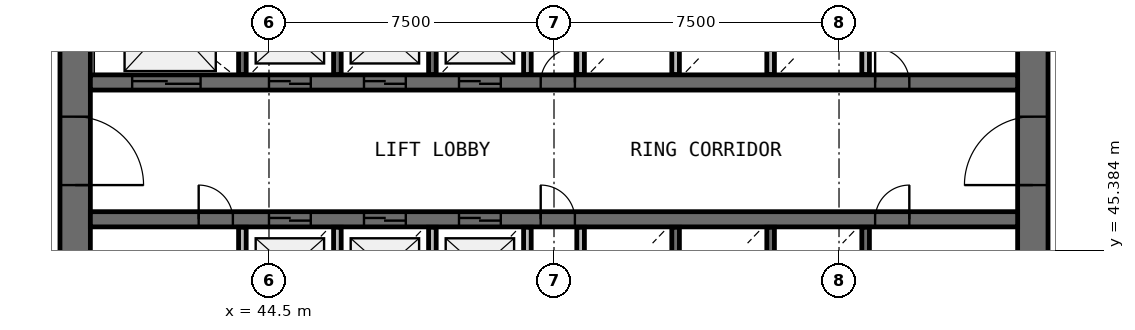
"""IFC4 building model, lengths in metres.
Left out: names, types, materials, properties, quantities, classifications, styles, units other than length and angle.
Written with IfcOpenShell. Run it as: python <this file> out.ifc"""

import sys

from ifc_helpers import new_model, si_unit, direction, frame, frame_2d, origin, place, context, subcontext, project, spatial, rectangle, extrude, source, transform, mapped, element, fill, save


model = new_model("IFC4")
c1 = context("Model", 3, precision=1e-05, world=origin(), true_north=direction((0.0, 1.0)))
c2 = subcontext(c1, "Body", "Model", "MODEL_VIEW")
j1 = project(units=[si_unit("LENGTHUNIT", "METRE"), si_unit("PLANEANGLEUNIT", "RADIAN")], contexts=[c1])
p1 = place(None, origin())
s1 = spatial("IfcSite", under=j1, at=p1, CompositionType="ELEMENT")
p2 = place(p1, origin())
s2 = spatial("IfcBuilding", under=s1, at=p2, CompositionType="ELEMENT")
p3 = place(p2, frame((0.0, 0.0, 124.9)))
s3 = spatial("IfcBuildingStorey", under=s2, at=p3, CompositionType="ELEMENT", Elevation=124.9)
p4 = place(p3, frame((64.6, 38.0, 0.0), z_axis=(0.0, 0.0, 1.0), x_axis=(0.0, 1.0, 0.0)))
e1 = element("IfcWall", 1, at=p4, inside=s3, PredefinedType="SHEAR", context=c2, shape_type="SweptSolid", body=[
    extrude(rectangle(XDim=20.0, YDim=0.8, at=frame_2d((10.0, 0.0))), origin(), (0.0, 0.0, 1.0), 4.1),
])
p5 = place(p4, frame((9.1, 0.0, 0.0)))
e2 = element("IfcOpeningElement", 2, at=p5, cuts=e1, PredefinedType="OPENING", context=c2, shape_type="SweptSolid", body=[
    extrude(rectangle(XDim=1.8, YDim=2.1, at=frame_2d((0.9, 1.05))), frame((0.0, 0.41, 0.0), z_axis=(0.0, -1.0, 0.0), x_axis=(1.0, 0.0, 0.0)), (0.0, 0.0, 1.0), 0.82),
])
p6 = place(p3, frame((39.4, 58.0, 0.0), z_axis=(0.0, 0.0, 1.0), x_axis=(0.0, -1.0, 0.0)))
e3 = element("IfcWall", 3, at=p6, inside=s3, PredefinedType="SHEAR", context=c2, shape_type="SweptSolid", body=[
    extrude(rectangle(XDim=20.0, YDim=0.8, at=frame_2d((10.0, 0.0))), origin(), (0.0, 0.0, 1.0), 4.1),
])
p7 = place(p6, frame((9.1, 0.0, 0.0)))
e4 = element("IfcOpeningElement", 4, at=p7, cuts=e3, PredefinedType="OPENING", context=c2, shape_type="SweptSolid", body=[
    extrude(rectangle(XDim=1.8, YDim=2.1, at=frame_2d((0.9, 1.05))), frame((0.0, 0.41, 0.0), z_axis=(0.0, -1.0, 0.0), x_axis=(1.0, 0.0, 0.0)), (0.0, 0.0, 1.0), 0.82),
])
p8 = place(p3, frame((39.8, 49.8, 0.0), z_axis=(0.0, 0.0, 1.0), x_axis=(1.0, 0.0, 0.0)))
e5 = element("IfcWall", 5, at=p8, inside=s3, PredefinedType="SHEAR", context=c2, shape_type="SweptSolid", body=[
    extrude(rectangle(XDim=24.4, YDim=0.4, at=frame_2d((12.2, 0.0))), origin(), (0.0, 0.0, 1.0), 4.1),
])
p9 = place(p8, frame((4.7, 0.0, 0.0)))
e6 = element("IfcOpeningElement", 6, at=p9, cuts=e5, PredefinedType="OPENING", context=c2, shape_type="SweptSolid", body=[
    extrude(rectangle(XDim=1.1, YDim=2.1, at=frame_2d((0.55, 1.05))), frame((0.0, 0.21, 0.0), z_axis=(0.0, -1.0, 0.0), x_axis=(1.0, 0.0, 0.0)), (0.0, 0.0, 1.0), 0.42),
])
p10 = place(p8, frame((7.2, 0.0, 0.0)))
e7 = element("IfcOpeningElement", 7, at=p10, cuts=e5, PredefinedType="OPENING", context=c2, shape_type="SweptSolid", body=[
    extrude(rectangle(XDim=1.1, YDim=2.1, at=frame_2d((0.55, 1.05))), frame((0.0, 0.21, 0.0), z_axis=(0.0, -1.0, 0.0), x_axis=(1.0, 0.0, 0.0)), (0.0, 0.0, 1.0), 0.42),
])
p11 = place(p8, frame((9.7, 0.0, 0.0)))
e8 = element("IfcOpeningElement", 8, at=p11, cuts=e5, PredefinedType="OPENING", context=c2, shape_type="SweptSolid", body=[
    extrude(rectangle(XDim=1.1, YDim=2.1, at=frame_2d((0.55, 1.05))), frame((0.0, 0.21, 0.0), z_axis=(0.0, -1.0, 0.0), x_axis=(1.0, 0.0, 0.0)), (0.0, 0.0, 1.0), 0.42),
])
p12 = place(p8, frame((1.1, 0.0, 0.0)))
e9 = element("IfcOpeningElement", 9, at=p12, cuts=e5, PredefinedType="OPENING", context=c2, shape_type="SweptSolid", body=[
    extrude(rectangle(XDim=1.8, YDim=2.4, at=frame_2d((0.9, 1.2))), frame((0.0, 0.21, 0.0), z_axis=(0.0, -1.0, 0.0), x_axis=(1.0, 0.0, 0.0)), (0.0, 0.0, 1.0), 0.42),
])
p13 = place(p8, frame((20.65, 0.0, 0.0)))
e10 = element("IfcOpeningElement", 10, at=p13, cuts=e5, PredefinedType="OPENING", context=c2, shape_type="SweptSolid", body=[
    extrude(rectangle(XDim=0.9, YDim=2.1, at=frame_2d((0.45, 1.05))), frame((0.0, 0.21, 0.0), z_axis=(0.0, -1.0, 0.0), x_axis=(1.0, 0.0, 0.0)), (0.0, 0.0, 1.0), 0.42),
])
p14 = place(p8, frame((11.85, 0.0, 0.0)))
e11 = element("IfcOpeningElement", 11, at=p14, cuts=e5, PredefinedType="OPENING", context=c2, shape_type="SweptSolid", body=[
    extrude(rectangle(XDim=0.9, YDim=2.1, at=frame_2d((0.45, 1.05))), frame((0.0, 0.21, 0.0), z_axis=(0.0, -1.0, 0.0), x_axis=(1.0, 0.0, 0.0)), (0.0, 0.0, 1.0), 0.42),
])
p15 = place(p3, frame((39.8, 46.2, 0.0), z_axis=(0.0, 0.0, 1.0), x_axis=(1.0, 0.0, 0.0)))
e12 = element("IfcWall", 12, at=p15, inside=s3, PredefinedType="SHEAR", context=c2, shape_type="SweptSolid", body=[
    extrude(rectangle(XDim=24.4, YDim=0.4, at=frame_2d((12.2, 0.0))), origin(), (0.0, 0.0, 1.0), 4.1),
])
p16 = place(p15, frame((4.7, 0.0, 0.0)))
e13 = element("IfcOpeningElement", 13, at=p16, cuts=e12, PredefinedType="OPENING", context=c2, shape_type="SweptSolid", body=[
    extrude(rectangle(XDim=1.1, YDim=2.1, at=frame_2d((0.55, 1.05))), frame((0.0, 0.21, 0.0), z_axis=(0.0, -1.0, 0.0), x_axis=(1.0, 0.0, 0.0)), (0.0, 0.0, 1.0), 0.42),
])
p17 = place(p15, frame((7.2, 0.0, 0.0)))
e14 = element("IfcOpeningElement", 14, at=p17, cuts=e12, PredefinedType="OPENING", context=c2, shape_type="SweptSolid", body=[
    extrude(rectangle(XDim=1.1, YDim=2.1, at=frame_2d((0.55, 1.05))), frame((0.0, 0.21, 0.0), z_axis=(0.0, -1.0, 0.0), x_axis=(1.0, 0.0, 0.0)), (0.0, 0.0, 1.0), 0.42),
])
p18 = place(p15, frame((9.7, 0.0, 0.0)))
e15 = element("IfcOpeningElement", 15, at=p18, cuts=e12, PredefinedType="OPENING", context=c2, shape_type="SweptSolid", body=[
    extrude(rectangle(XDim=1.1, YDim=2.1, at=frame_2d((0.55, 1.05))), frame((0.0, 0.21, 0.0), z_axis=(0.0, -1.0, 0.0), x_axis=(1.0, 0.0, 0.0)), (0.0, 0.0, 1.0), 0.42),
])
p19 = place(p15, frame((20.65, 0.0, 0.0)))
e16 = element("IfcOpeningElement", 16, at=p19, cuts=e12, PredefinedType="OPENING", context=c2, shape_type="SweptSolid", body=[
    extrude(rectangle(XDim=0.9, YDim=2.1, at=frame_2d((0.45, 1.05))), frame((0.0, 0.21, 0.0), z_axis=(0.0, -1.0, 0.0), x_axis=(1.0, 0.0, 0.0)), (0.0, 0.0, 1.0), 0.42),
])
p20 = place(p15, frame((2.85, 0.0, 0.0)))
e17 = element("IfcOpeningElement", 17, at=p20, cuts=e12, PredefinedType="OPENING", context=c2, shape_type="SweptSolid", body=[
    extrude(rectangle(XDim=0.9, YDim=2.1, at=frame_2d((0.45, 1.05))), frame((0.0, 0.21, 0.0), z_axis=(0.0, -1.0, 0.0), x_axis=(1.0, 0.0, 0.0)), (0.0, 0.0, 1.0), 0.42),
])
p21 = place(p15, frame((11.85, 0.0, 0.0)))
e18 = element("IfcOpeningElement", 18, at=p21, cuts=e12, PredefinedType="OPENING", context=c2, shape_type="SweptSolid", body=[
    extrude(rectangle(XDim=0.9, YDim=2.1, at=frame_2d((0.45, 1.05))), frame((0.0, 0.21, 0.0), z_axis=(0.0, -1.0, 0.0), x_axis=(1.0, 0.0, 0.0)), (0.0, 0.0, 1.0), 0.42),
])
for number, where, z_axis, x_axis in (
    (19, (43.8, 45.99, 0.0), (0.0, 0.0, 1.0), (0.0, -1.0, 0.0)),
    (20, (43.8, 52.37, 0.0), (0.0, 0.0, 1.0), (0.0, -1.0, 0.0)),
):
    element("IfcWall", number, at=place(p3, frame(where, z_axis=z_axis, x_axis=x_axis)), inside=s3, PredefinedType="SOLIDWALL", context=c2, shape_type="SweptSolid", body=[
        extrude(rectangle(XDim=2.36, YDim=0.2, at=frame_2d((1.18, 0.0))), origin(), (0.0, 0.0, 1.0), 3.6),
    ])
p22 = place(p3, frame((46.3, 43.6, 0.0), z_axis=(0.0, 0.0, 1.0), x_axis=(0.0, 1.0, 0.0)))
e21 = element("IfcWall", 21, at=p22, inside=s3, PredefinedType="SOLIDWALL", context=c2, shape_type="SweptSolid", body=[
    extrude(rectangle(XDim=2.39, YDim=0.2, at=frame_2d((1.195, 0.0))), origin(), (0.0, 0.0, 1.0), 3.6),
])
for number, where, z_axis, x_axis in (
    (22, (46.3, 50.01, 0.0), (0.0, 0.0, 1.0), (0.0, 1.0, 0.0)),
    (23, (48.8, 43.63, 0.0), (0.0, 0.0, 1.0), (0.0, 1.0, 0.0)),
    (24, (48.8, 50.01, 0.0), (0.0, 0.0, 1.0), (0.0, 1.0, 0.0)),
    (25, (51.3, 43.63, 0.0), (0.0, 0.0, 1.0), (0.0, 1.0, 0.0)),
):
    element("IfcWall", number, at=place(p3, frame(where, z_axis=z_axis, x_axis=x_axis)), inside=s3, PredefinedType="SOLIDWALL", context=c2, shape_type="SweptSolid", body=[
        extrude(rectangle(XDim=2.36, YDim=0.2, at=frame_2d((1.18, 0.0))), origin(), (0.0, 0.0, 1.0), 3.6),
    ])
for number, where, z_axis, x_axis in (
    (26, (51.3, 50.01, 0.0), (0.0, 0.0, 1.0), (0.0, 1.0, 0.0)),
    (27, (52.7, 45.99, 0.0), (0.0, 0.0, 1.0), (0.0, -1.0, 0.0)),
):
    element("IfcWall", number, at=place(p3, frame(where, z_axis=z_axis, x_axis=x_axis)), inside=s3, PredefinedType="SOLIDWALL", context=c2, shape_type="SweptSolid", body=[
        extrude(rectangle(XDim=2.39, YDim=0.2, at=frame_2d((1.195, 0.0))), origin(), (0.0, 0.0, 1.0), 3.6),
    ])
for number, where, z_axis, x_axis in (
    (28, (52.7, 52.37, 0.0), (0.0, 0.0, 1.0), (0.0, -1.0, 0.0)),
    (29, (55.2, 43.63, 0.0), (0.0, 0.0, 1.0), (0.0, 1.0, 0.0)),
    (30, (55.2, 50.01, 0.0), (0.0, 0.0, 1.0), (0.0, 1.0, 0.0)),
    (31, (57.7, 43.63, 0.0), (0.0, 0.0, 1.0), (0.0, 1.0, 0.0)),
):
    element("IfcWall", number, at=place(p3, frame(where, z_axis=z_axis, x_axis=x_axis)), inside=s3, PredefinedType="SOLIDWALL", context=c2, shape_type="SweptSolid", body=[
        extrude(rectangle(XDim=2.36, YDim=0.2, at=frame_2d((1.18, 0.0))), origin(), (0.0, 0.0, 1.0), 3.6),
    ])
p23 = place(p3, frame((57.7, 50.01, 0.0), z_axis=(0.0, 0.0, 1.0), x_axis=(0.0, 1.0, 0.0)))
e32 = element("IfcWall", 32, at=p23, inside=s3, PredefinedType="SOLIDWALL", context=c2, shape_type="SweptSolid", body=[
    extrude(rectangle(XDim=2.39, YDim=0.2, at=frame_2d((1.195, 0.0))), origin(), (0.0, 0.0, 1.0), 3.6),
])
for number, where, z_axis, x_axis in (
    (33, (60.2, 43.63, 0.0), (0.0, 0.0, 1.0), (0.0, 1.0, 0.0)),
    (34, (60.2, 50.01, 0.0), (0.0, 0.0, 1.0), (0.0, 1.0, 0.0)),
):
    element("IfcWall", number, at=place(p3, frame(where, z_axis=z_axis, x_axis=x_axis)), inside=s3, PredefinedType="SOLIDWALL", context=c2, shape_type="SweptSolid", body=[
        extrude(rectangle(XDim=2.36, YDim=0.2, at=frame_2d((1.18, 0.0))), origin(), (0.0, 0.0, 1.0), 3.6),
    ])
m1 = source(origin(), c2, "Body", "SweptSolid", [
    extrude(rectangle(XDim=1.8, YDim=2.1, at=frame_2d((0.9, 1.05))), frame((0.0, 0.025, 0.0), z_axis=(0.0, -1.0, 0.0), x_axis=(1.0, 0.0, 0.0)), (0.0, 0.0, 1.0), 0.05),
])
p24 = place(p7, origin())
e35 = element("IfcDoor", 35, at=p24, inside=s3, OperationType="SINGLE_SWING_RIGHT", PredefinedType="DOOR", context=c2, shape_type="MappedRepresentation", body=[
    mapped(m1, transform((0.0, 0.0, 0.0), scale=1.0)),
])
fill(e4, e35)
p25 = place(p5, origin())
e36 = element("IfcDoor", 36, at=p25, inside=s3, OperationType="SINGLE_SWING_LEFT", PredefinedType="DOOR", context=c2, shape_type="MappedRepresentation", body=[
    mapped(m1, transform((0.0, 0.0, 0.0), scale=1.0)),
])
fill(e2, e36)
m2 = source(origin(), c2, "Body", "SweptSolid", [
    extrude(rectangle(XDim=1.1, YDim=2.1, at=frame_2d((0.55, 1.05))), frame((0.0, 0.025, 0.0), z_axis=(0.0, -1.0, 0.0), x_axis=(1.0, 0.0, 0.0)), (0.0, 0.0, 1.0), 0.05),
])
p26 = place(p9, origin())
e37 = element("IfcDoor", 37, at=p26, inside=s3, OperationType="DOUBLE_DOOR_SLIDING", PredefinedType="USERDEFINED", context=c2, shape_type="MappedRepresentation", body=[
    mapped(m2, transform((0.0, 0.0, 0.0), scale=1.0)),
])
fill(e6, e37)
p27 = place(p10, origin())
e38 = element("IfcDoor", 38, at=p27, inside=s3, OperationType="DOUBLE_DOOR_SLIDING", PredefinedType="USERDEFINED", context=c2, shape_type="MappedRepresentation", body=[
    mapped(m2, transform((0.0, 0.0, 0.0), scale=1.0)),
])
fill(e7, e38)
p28 = place(p11, origin())
e39 = element("IfcDoor", 39, at=p28, inside=s3, OperationType="DOUBLE_DOOR_SLIDING", PredefinedType="USERDEFINED", context=c2, shape_type="MappedRepresentation", body=[
    mapped(m2, transform((0.0, 0.0, 0.0), scale=1.0)),
])
fill(e8, e39)
p29 = place(p16, origin())
e40 = element("IfcDoor", 40, at=p29, inside=s3, OperationType="DOUBLE_DOOR_SLIDING", PredefinedType="USERDEFINED", context=c2, shape_type="MappedRepresentation", body=[
    mapped(m2, transform((0.0, 0.0, 0.0), scale=1.0)),
])
fill(e13, e40)
p30 = place(p17, origin())
e41 = element("IfcDoor", 41, at=p30, inside=s3, OperationType="DOUBLE_DOOR_SLIDING", PredefinedType="USERDEFINED", context=c2, shape_type="MappedRepresentation", body=[
    mapped(m2, transform((0.0, 0.0, 0.0), scale=1.0)),
])
fill(e14, e41)
p31 = place(p18, origin())
e42 = element("IfcDoor", 42, at=p31, inside=s3, OperationType="DOUBLE_DOOR_SLIDING", PredefinedType="USERDEFINED", context=c2, shape_type="MappedRepresentation", body=[
    mapped(m2, transform((0.0, 0.0, 0.0), scale=1.0)),
])
fill(e15, e42)
m3 = source(origin(), c2, "Body", "SweptSolid", [
    extrude(rectangle(XDim=1.8, YDim=2.4, at=frame_2d((0.9, 1.2))), frame((0.0, 0.025, 0.0), z_axis=(0.0, -1.0, 0.0), x_axis=(1.0, 0.0, 0.0)), (0.0, 0.0, 1.0), 0.05),
])
p32 = place(p12, origin())
e43 = element("IfcDoor", 43, at=p32, inside=s3, OperationType="DOUBLE_DOOR_SLIDING", PredefinedType="USERDEFINED", context=c2, shape_type="MappedRepresentation", body=[
    mapped(m3, transform((0.0, 0.0, 0.0), scale=1.0)),
])
fill(e9, e43)
m4 = source(origin(), c2, "Body", "SweptSolid", [
    extrude(rectangle(XDim=0.9, YDim=2.1, at=frame_2d((0.45, 1.05))), frame((0.0, 0.025, 0.0), z_axis=(0.0, -1.0, 0.0), x_axis=(1.0, 0.0, 0.0)), (0.0, 0.0, 1.0), 0.05),
])
p33 = place(p19, origin())
e44 = element("IfcDoor", 44, at=p33, inside=s3, OperationType="SINGLE_SWING_RIGHT", PredefinedType="DOOR", context=c2, shape_type="MappedRepresentation", body=[
    mapped(m4, transform((0.0, 0.0, 0.0), scale=1.0)),
])
fill(e16, e44)
p34 = place(p13, origin())
e45 = element("IfcDoor", 45, at=p34, inside=s3, OperationType="SINGLE_SWING_LEFT", PredefinedType="DOOR", context=c2, shape_type="MappedRepresentation", body=[
    mapped(m4, transform((0.0, 0.0, 0.0), scale=1.0)),
])
fill(e10, e45)
p35 = place(p20, origin())
e46 = element("IfcDoor", 46, at=p35, inside=s3, OperationType="SINGLE_SWING_LEFT", PredefinedType="DOOR", context=c2, shape_type="MappedRepresentation", body=[
    mapped(m4, transform((0.0, 0.0, 0.0), scale=1.0)),
])
fill(e17, e46)
p36 = place(p14, origin())
e47 = element("IfcDoor", 47, at=p36, inside=s3, OperationType="SINGLE_SWING_RIGHT", PredefinedType="DOOR", context=c2, shape_type="MappedRepresentation", body=[
    mapped(m4, transform((0.0, 0.0, 0.0), scale=1.0)),
])
fill(e11, e47)
p37 = place(p21, origin())
e48 = element("IfcDoor", 48, at=p37, inside=s3, OperationType="SINGLE_SWING_LEFT", PredefinedType="DOOR", context=c2, shape_type="MappedRepresentation", body=[
    mapped(m4, transform((0.0, 0.0, 0.0), scale=1.0)),
])
fill(e18, e48)
save(model, sys.argv[1])
